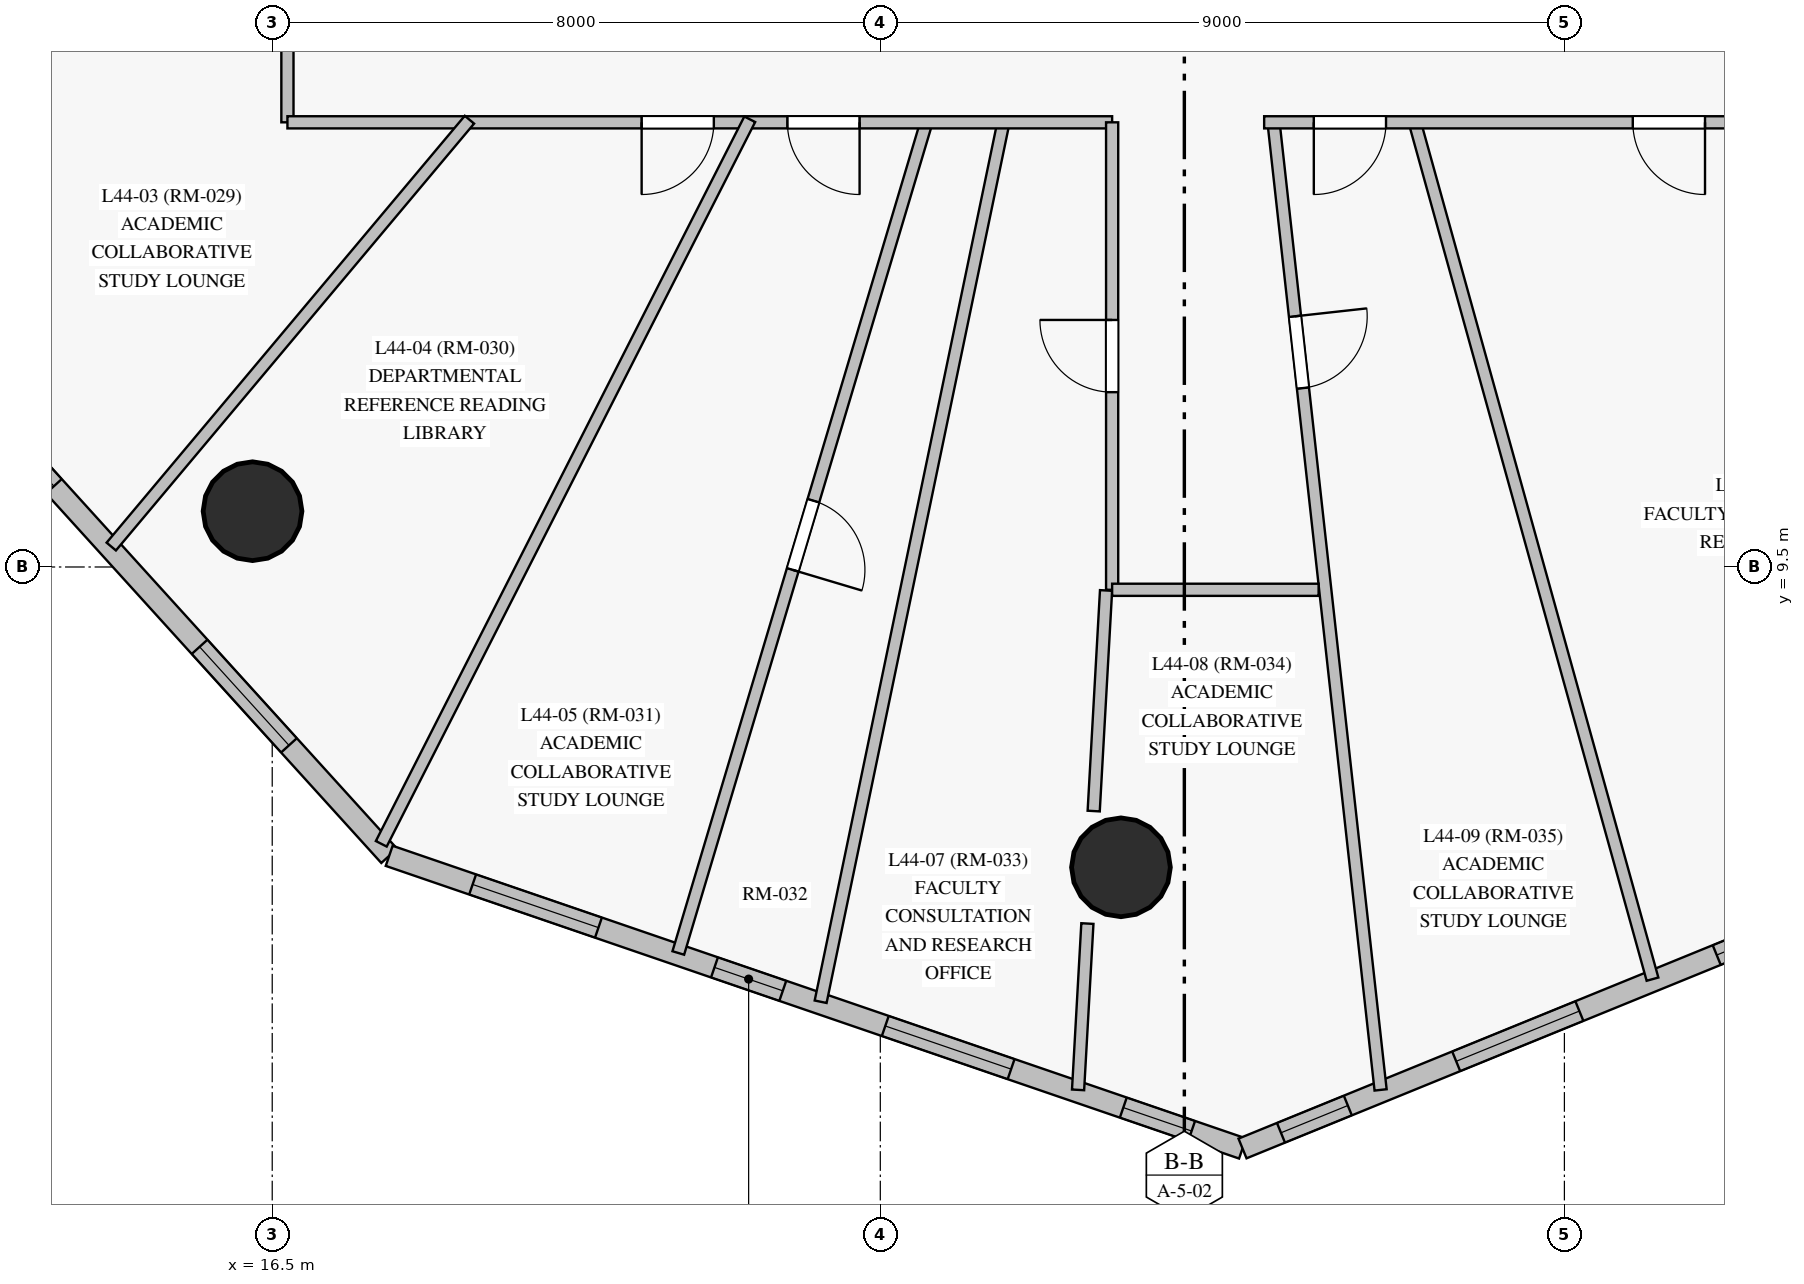
"""IFC4 building model, lengths in metres.
Left out: names, types, materials, properties, quantities, classifications, styles, units other than length and angle.
Written with IfcOpenShell. Run it as: python <this file> out.ifc"""

import sys

from ifc_helpers import new_model, si_unit, direction, frame, frame_2d, origin, origin_with_axes, origin_2d, place, context, subcontext, project, spatial, rectangle, circle, extrude, source, transform, mapped, element, fill, save


model = new_model("IFC4")
c1 = context("Model", 3, precision=1e-05, world=origin(), true_north=direction((0.0, 1.0)))
c2 = subcontext(c1, "Body", "Model", "MODEL_VIEW")
j1 = project(units=[si_unit("LENGTHUNIT", "METRE"), si_unit("PLANEANGLEUNIT", "RADIAN")], contexts=[c1])
p1 = place(None, origin())
s1 = spatial("IfcSite", under=j1, at=p1, CompositionType="ELEMENT")
p2 = place(p1, origin())
s2 = spatial("IfcBuilding", under=s1, at=p2, CompositionType="ELEMENT")
p3 = place(p2, frame((0.0, 0.0, 156.55)))
s3 = spatial("IfcBuildingStorey", under=s2, at=p3, CompositionType="ELEMENT", Elevation=156.55)
m1 = source(origin_with_axes(), c2, "Body", "SweptSolid", [
    extrude(circle(Radius=0.65, at=origin_2d()), origin(), (0.0, 0.0, 1.0), 3.05),
])
for number, where, z_axis, x_axis in (
    (1, (16.241, 10.234, 0.0), (0.0, 0.0, 1.0), (1.0, 0.0, 0.0)),
    (2, (27.666, 5.549, 0.0), (0.0, 0.0, 1.0), (1.0, 0.0, 0.0)),
):
    element("IfcColumn", number, at=place(p3, frame(where, z_axis=z_axis, x_axis=x_axis)), inside=s3, PredefinedType="COLUMN", context=c2, shape_type="MappedRepresentation", body=[
        mapped(m1, transform((0.0, 0.0, 0.0), scale=1.0)),
    ])
p4 = place(p3, frame((11.679, 12.711, 0.0), z_axis=(0.0, 0.0, 1.0), x_axis=(0.671864956499, -0.740673666488, 0.0)))
e3 = element("IfcWall", 3, at=p4, inside=s3, PredefinedType="SOLIDWALL", context=c2, shape_type="SweptSolid", body=[
    extrude(rectangle(XDim=9.466, YDim=0.28, at=frame_2d((4.733, 0.0))), origin(), (0.0, 0.0, 1.0), 2.825),
])
p5 = place(p4, frame((1.151, 0.0, 0.85)))
e4 = element("IfcOpeningElement", 4, at=p5, cuts=e3, PredefinedType="OPENING", context=c2, shape_type="SweptSolid", body=[
    extrude(rectangle(XDim=1.75, YDim=1.65, at=frame_2d((0.875, 0.825))), frame((0.0, 0.15, 0.0), z_axis=(0.0, -1.0, 0.0), x_axis=(1.0, 0.0, 0.0)), (0.0, 0.0, 1.0), 0.3),
])
p6 = place(p4, frame((5.754, 0.0, 0.85)))
e5 = element("IfcOpeningElement", 5, at=p6, cuts=e3, PredefinedType="OPENING", context=c2, shape_type="SweptSolid", body=[
    extrude(rectangle(XDim=1.75, YDim=1.65, at=frame_2d((0.875, 0.825))), frame((0.0, 0.15, 0.0), z_axis=(0.0, -1.0, 0.0), x_axis=(1.0, 0.0, 0.0)), (0.0, 0.0, 1.0), 0.3),
])
p7 = place(p3, frame((18.039, 5.7, 0.0), z_axis=(0.0, 0.0, 1.0), x_axis=(0.945926650716, -0.324380596624, 0.0)))
e6 = element("IfcWall", 6, at=p7, inside=s3, PredefinedType="SOLIDWALL", context=c2, shape_type="SweptSolid", body=[
    extrude(rectangle(XDim=11.868, YDim=0.28, at=frame_2d((5.934, 0.0))), origin(), (0.0, 0.0, 1.0), 2.825),
])
p8 = place(p7, frame((1.16, 0.0, 0.85)))
e7 = element("IfcOpeningElement", 7, at=p8, cuts=e6, PredefinedType="OPENING", context=c2, shape_type="SweptSolid", body=[
    extrude(rectangle(XDim=1.75, YDim=1.65, at=frame_2d((0.875, 0.825))), frame((0.0, 0.15, 0.0), z_axis=(0.0, -1.0, 0.0), x_axis=(1.0, 0.0, 0.0)), (0.0, 0.0, 1.0), 0.3),
])
p9 = place(p7, frame((4.524, 0.0, 0.85)))
e8 = element("IfcOpeningElement", 8, at=p9, cuts=e6, PredefinedType="OPENING", context=c2, shape_type="SweptSolid", body=[
    extrude(rectangle(XDim=0.95, YDim=1.5, at=frame_2d((0.475, 0.75))), frame((0.0, 0.15, 0.0), z_axis=(0.0, -1.0, 0.0), x_axis=(1.0, 0.0, 0.0)), (0.0, 0.0, 1.0), 0.3),
])
p10 = place(p7, frame((6.9, 0.0, 0.85)))
e9 = element("IfcOpeningElement", 9, at=p10, cuts=e6, PredefinedType="OPENING", context=c2, shape_type="SweptSolid", body=[
    extrude(rectangle(XDim=1.75, YDim=1.65, at=frame_2d((0.875, 0.825))), frame((0.0, 0.15, 0.0), z_axis=(0.0, -1.0, 0.0), x_axis=(1.0, 0.0, 0.0)), (0.0, 0.0, 1.0), 0.3),
])
p11 = place(p7, frame((10.21, 0.0, 0.85)))
e10 = element("IfcOpeningElement", 10, at=p11, cuts=e6, PredefinedType="OPENING", context=c2, shape_type="SweptSolid", body=[
    extrude(rectangle(XDim=0.95, YDim=1.5, at=frame_2d((0.475, 0.75))), frame((0.0, 0.15, 0.0), z_axis=(0.0, -1.0, 0.0), x_axis=(1.0, 0.0, 0.0)), (0.0, 0.0, 1.0), 0.3),
])
p12 = place(p3, frame((29.265, 1.85, 0.0), z_axis=(0.0, 0.0, 1.0), x_axis=(0.925942104455, 0.377665485842, 0.0)))
e11 = element("IfcWall", 11, at=p12, inside=s3, PredefinedType="SOLIDWALL", context=c2, shape_type="SweptSolid", body=[
    extrude(rectangle(XDim=9.446, YDim=0.28, at=frame_2d((4.723, 0.0))), origin(), (0.0, 0.0, 1.0), 2.825),
])
p13 = place(p12, frame((0.546, 0.0, 0.85)))
e12 = element("IfcOpeningElement", 12, at=p13, cuts=e11, PredefinedType="OPENING", context=c2, shape_type="SweptSolid", body=[
    extrude(rectangle(XDim=0.95, YDim=1.5, at=frame_2d((0.475, 0.75))), frame((0.0, 0.15, 0.0), z_axis=(0.0, -1.0, 0.0), x_axis=(1.0, 0.0, 0.0)), (0.0, 0.0, 1.0), 0.3),
])
p14 = place(p12, frame((3.036, 0.0, 0.85)))
e13 = element("IfcOpeningElement", 13, at=p14, cuts=e11, PredefinedType="OPENING", context=c2, shape_type="SweptSolid", body=[
    extrude(rectangle(XDim=1.75, YDim=1.65, at=frame_2d((0.875, 0.825))), frame((0.0, 0.15, 0.0), z_axis=(0.0, -1.0, 0.0), x_axis=(1.0, 0.0, 0.0)), (0.0, 0.0, 1.0), 0.3),
])
p15 = place(p12, frame((6.738, 0.0, 0.85)))
e14 = element("IfcOpeningElement", 14, at=p15, cuts=e11, PredefinedType="OPENING", context=c2, shape_type="SweptSolid", body=[
    extrude(rectangle(XDim=1.75, YDim=1.65, at=frame_2d((0.875, 0.825))), frame((0.0, 0.15, 0.0), z_axis=(0.0, -1.0, 0.0), x_axis=(1.0, 0.0, 0.0)), (0.0, 0.0, 1.0), 0.3),
])
p16 = place(p3, frame((16.7, 15.35, 0.0), z_axis=(0.0, 0.0, 1.0), x_axis=(0.0, 1.0, 0.0)))
e15 = element("IfcWall", 15, at=p16, inside=s3, PredefinedType="PARTITIONING", context=c2, shape_type="SweptSolid", body=[
    extrude(rectangle(XDim=22.3, YDim=0.16, at=frame_2d((11.15, 0.0))), origin(), (0.0, 0.0, 1.0), 2.275),
])
p17 = place(p16, frame((7.33, 0.0, 0.0)))
e16 = element("IfcOpeningElement", 16, at=p17, cuts=e15, PredefinedType="OPENING", context=c2, shape_type="SweptSolid", body=[
    extrude(rectangle(XDim=0.95, YDim=2.15, at=frame_2d((0.475, 1.075))), frame((0.0, 0.09, 0.0), z_axis=(0.0, -1.0, 0.0), x_axis=(1.0, 0.0, 0.0)), (0.0, 0.0, 1.0), 0.18),
])
p18 = place(p16, frame((5.1, 0.0, 0.0)))
e17 = element("IfcOpeningElement", 17, at=p18, cuts=e15, PredefinedType="OPENING", context=c2, shape_type="SweptSolid", body=[
    extrude(rectangle(XDim=0.96, YDim=2.15, at=frame_2d((0.48, 1.075))), frame((0.0, 0.09, 0.0), z_axis=(0.0, -1.0, 0.0), x_axis=(1.0, 0.0, 0.0)), (0.0, 0.0, 1.0), 0.18),
])
p19 = place(p16, frame((1.328, 0.0, 0.0)))
e18 = element("IfcOpeningElement", 18, at=p19, cuts=e15, PredefinedType="OPENING", context=c2, shape_type="SweptSolid", body=[
    extrude(rectangle(XDim=0.95, YDim=2.15, at=frame_2d((0.475, 1.075))), frame((0.0, 0.09, 0.0), z_axis=(0.0, -1.0, 0.0), x_axis=(1.0, 0.0, 0.0)), (0.0, 0.0, 1.0), 0.18),
])
p20 = place(p16, frame((14.02, 0.0, 0.0)))
e19 = element("IfcOpeningElement", 19, at=p20, cuts=e15, PredefinedType="OPENING", context=c2, shape_type="SweptSolid", body=[
    extrude(rectangle(XDim=0.95, YDim=2.15, at=frame_2d((0.475, 1.075))), frame((0.0, 0.09, 0.0), z_axis=(0.0, -1.0, 0.0), x_axis=(1.0, 0.0, 0.0)), (0.0, 0.0, 1.0), 0.18),
])
p21 = place(p3, frame((29.67, 15.38, 0.0), z_axis=(0.0, 0.0, 1.0), x_axis=(0.109963941435, -0.99393557718, 0.0)))
e20 = element("IfcWall", 20, at=p21, inside=s3, PredefinedType="PARTITIONING", context=c2, shape_type="SweptSolid", body=[
    extrude(rectangle(XDim=12.837, YDim=0.16, at=frame_2d((6.418, 0.0))), origin(), (0.0, 0.0, 1.0), 2.825),
])
p22 = place(p21, frame((2.598, 0.0, 0.0)))
e21 = element("IfcOpeningElement", 21, at=p22, cuts=e20, PredefinedType="OPENING", context=c2, shape_type="SweptSolid", body=[
    extrude(rectangle(XDim=0.95, YDim=2.15, at=frame_2d((0.475, 1.075))), frame((0.0, 0.09, 0.0), z_axis=(0.0, -1.0, 0.0), x_axis=(1.0, 0.0, 0.0)), (0.0, 0.0, 1.0), 0.18),
])
p23 = place(p3, frame((26.127, 15.379, 0.0), z_axis=(0.0, 0.0, 1.0), x_axis=(-0.203560877861, -0.979062290666, 0.0)))
e22 = element("IfcWall", 22, at=p23, inside=s3, PredefinedType="PARTITIONING", context=c2, shape_type="SweptSolid", body=[
    extrude(rectangle(XDim=11.847, YDim=0.16, at=frame_2d((5.924, 0.0))), origin(), (0.0, 0.0, 1.0), 2.825),
])
p24 = place(p3, frame((31.523, 15.379, 0.0), z_axis=(0.0, 0.0, 1.0), x_axis=(0.267361493454, -0.963596301268, 0.0)))
e23 = element("IfcWall", 23, at=p24, inside=s3, PredefinedType="PARTITIONING", context=c2, shape_type="SweptSolid", body=[
    extrude(rectangle(XDim=11.729, YDim=0.16, at=frame_2d((5.864, 0.0))), origin(), (0.0, 0.0, 1.0), 2.825),
])
p25 = place(p3, frame((25.115, 15.379, 0.0), z_axis=(0.0, 0.0, 1.0), x_axis=(-0.286223364171, -0.958162922369, 0.0)))
e24 = element("IfcWall", 24, at=p25, inside=s3, PredefinedType="PARTITIONING", context=c2, shape_type="SweptSolid", body=[
    extrude(rectangle(XDim=11.435, YDim=0.16, at=frame_2d((5.718, 0.0))), origin(), (0.0, 0.0, 1.0), 2.825),
])
p26 = place(p25, frame((5.225, 0.0, 0.0)))
e25 = element("IfcOpeningElement", 25, at=p26, cuts=e24, PredefinedType="OPENING", context=c2, shape_type="SweptSolid", body=[
    extrude(rectangle(XDim=0.95, YDim=2.15, at=frame_2d((0.475, 1.075))), frame((0.0, 0.09, 0.0), z_axis=(0.0, -1.0, 0.0), x_axis=(1.0, 0.0, 0.0)), (0.0, 0.0, 1.0), 0.18),
])
p27 = place(p3, frame((27.55, 15.35, 0.0), z_axis=(0.0, 0.0, 1.0), x_axis=(-1.0, 0.0, 0.0)))
e26 = element("IfcWall", 26, at=p27, inside=s3, PredefinedType="PARTITIONING", context=c2, shape_type="SweptSolid", body=[
    extrude(rectangle(XDim=10.85, YDim=0.16, at=frame_2d((5.425, 0.0))), origin(), (0.0, 0.0, 1.0), 2.375),
])
p28 = place(p27, frame((5.24, 0.0, 0.0)))
e27 = element("IfcOpeningElement", 27, at=p28, cuts=e26, PredefinedType="OPENING", context=c2, shape_type="SweptSolid", body=[
    extrude(rectangle(XDim=0.95, YDim=2.15, at=frame_2d((0.475, 1.075))), frame((0.0, 0.09, 0.0), z_axis=(0.0, -1.0, 0.0), x_axis=(1.0, 0.0, 0.0)), (0.0, 0.0, 1.0), 0.18),
])
p29 = place(p27, frame((3.323, 0.0, 0.0)))
e28 = element("IfcOpeningElement", 28, at=p29, cuts=e26, PredefinedType="OPENING", context=c2, shape_type="SweptSolid", body=[
    extrude(rectangle(XDim=0.95, YDim=2.15, at=frame_2d((0.475, 1.075))), frame((0.0, 0.09, 0.0), z_axis=(0.0, -1.0, 0.0), x_axis=(1.0, 0.0, 0.0)), (0.0, 0.0, 1.0), 0.18),
])
p30 = place(p3, frame((40.2, 15.35, 0.0), z_axis=(0.0, 0.0, 1.0), x_axis=(-1.0, 0.0, 0.0)))
e29 = element("IfcWall", 29, at=p30, inside=s3, PredefinedType="PARTITIONING", context=c2, shape_type="SweptSolid", body=[
    extrude(rectangle(XDim=10.65, YDim=0.16, at=frame_2d((5.325, 0.0))), origin(), (0.0, 0.0, 1.0), 2.275),
])
p31 = place(p30, frame((9.047, 0.0, 0.0)))
e30 = element("IfcOpeningElement", 30, at=p31, cuts=e29, PredefinedType="OPENING", context=c2, shape_type="SweptSolid", body=[
    extrude(rectangle(XDim=0.95, YDim=2.15, at=frame_2d((0.475, 1.075))), frame((0.0, 0.09, 0.0), z_axis=(0.0, -1.0, 0.0), x_axis=(1.0, 0.0, 0.0)), (0.0, 0.0, 1.0), 0.18),
])
p32 = place(p30, frame((4.85, 0.0, 0.0)))
e31 = element("IfcOpeningElement", 31, at=p32, cuts=e29, PredefinedType="OPENING", context=c2, shape_type="SweptSolid", body=[
    extrude(rectangle(XDim=0.95, YDim=2.15, at=frame_2d((0.475, 1.075))), frame((0.0, 0.09, 0.0), z_axis=(0.0, -1.0, 0.0), x_axis=(1.0, 0.0, 0.0)), (0.0, 0.0, 1.0), 0.18),
])
p33 = place(p3, frame((22.782, 15.39, 0.0), z_axis=(0.0, 0.0, 1.0), x_axis=(-0.453312470981, -0.891351672267, 0.0)))
e32 = element("IfcWall", 32, at=p33, inside=s3, PredefinedType="PARTITIONING", context=c2, shape_type="SweptSolid", body=[
    extrude(rectangle(XDim=10.694, YDim=0.16, at=frame_2d((5.347, 0.0))), origin(), (0.0, 0.0, 1.0), 2.825),
])
p34 = place(p3, frame((19.094, 15.385, 0.0), z_axis=(0.0, 0.0, 1.0), x_axis=(-0.642788201526, -0.766043946506, 0.0)))
e33 = element("IfcWall", 33, at=p34, inside=s3, PredefinedType="PARTITIONING", context=c2, shape_type="SweptSolid", body=[
    extrude(rectangle(XDim=7.331, YDim=0.16, at=frame_2d((3.666, 0.0))), origin(), (0.0, 0.0, 1.0), 2.275),
])
p35 = place(p3, frame((16.726, 19.243, 0.0), z_axis=(0.0, 0.0, 1.0), x_axis=(-0.849037712217, -0.528332247012, 0.0)))
e34 = element("IfcWall", 34, at=p35, inside=s3, PredefinedType="PARTITIONING", context=c2, shape_type="SweptSolid", body=[
    extrude(rectangle(XDim=6.956, YDim=0.16, at=frame_2d((3.478, 0.0))), origin(), (0.0, 0.0, 1.0), 2.825),
])
p36 = place(p3, frame((27.55, 9.2, 0.0), z_axis=(0.0, 0.0, 1.0), x_axis=(0.0, 1.0, 0.0)))
e35 = element("IfcWall", 35, at=p36, inside=s3, PredefinedType="PARTITIONING", context=c2, shape_type="SweptSolid", body=[
    extrude(rectangle(XDim=6.15, YDim=0.16, at=frame_2d((3.075, 0.0))), origin(), (0.0, 0.0, 1.0), 2.275),
])
p37 = place(p36, frame((2.6, 0.0, 0.0)))
e36 = element("IfcOpeningElement", 36, at=p37, cuts=e35, PredefinedType="OPENING", context=c2, shape_type="SweptSolid", body=[
    extrude(rectangle(XDim=0.95, YDim=2.15, at=frame_2d((0.475, 1.075))), frame((0.0, 0.09, 0.0), z_axis=(0.0, -1.0, 0.0), x_axis=(1.0, 0.0, 0.0)), (0.0, 0.0, 1.0), 0.18),
])
p38 = place(p3, frame((27.47, 9.191, 0.0), z_axis=(0.0, 0.0, 1.0), x_axis=(-0.0559398618, -0.998434139972, 0.0)))
e37 = element("IfcWall", 37, at=p38, inside=s3, PredefinedType="PARTITIONING", context=c2, shape_type="SweptSolid", body=[
    extrude(rectangle(XDim=2.907, YDim=0.16, at=frame_2d((1.453, 0.0))), origin(), (0.0, 0.0, 1.0), 2.275),
])
p39 = place(p3, frame((27.224, 4.809, 0.0), z_axis=(0.0, 0.0, 1.0), x_axis=(-0.055926613573, -0.99843488215, 0.0)))
e38 = element("IfcWall", 38, at=p39, inside=s3, PredefinedType="PARTITIONING", context=c2, shape_type="SweptSolid", body=[
    extrude(rectangle(XDim=2.191, YDim=0.16, at=frame_2d((1.096, 0.0))), origin(), (0.0, 0.0, 1.0), 2.825),
])
p40 = place(p3, frame((30.266, 9.2, 0.0), z_axis=(0.0, 0.0, 1.0), x_axis=(-1.0, 0.0, 0.0)))
e39 = element("IfcWall", 39, at=p40, inside=s3, PredefinedType="PARTITIONING", context=c2, shape_type="SweptSolid", body=[
    extrude(rectangle(XDim=2.716, YDim=0.16, at=frame_2d((1.358, 0.0))), origin(), (0.0, 0.0, 1.0), 2.495),
])
m2 = source(origin_with_axes(), c2, "Body", "SweptSolid", [
    extrude(rectangle(XDim=1.75, YDim=1.65, at=frame_2d((0.875, 0.825))), frame((0.0, 0.03, 0.0), z_axis=(0.0, -1.0, 0.0), x_axis=(1.0, 0.0, 0.0)), (0.0, 0.0, 1.0), 0.06),
])
p41 = place(p5, origin())
e40 = element("IfcWindow", 40, at=p41, inside=s3, PartitioningType="SINGLE_PANEL", PredefinedType="WINDOW", context=c2, shape_type="MappedRepresentation", body=[
    mapped(m2, transform((0.0, 0.0, 0.0), scale=1.0)),
])
fill(e4, e40)
p42 = place(p6, origin())
e41 = element("IfcWindow", 41, at=p42, inside=s3, PartitioningType="SINGLE_PANEL", PredefinedType="WINDOW", context=c2, shape_type="MappedRepresentation", body=[
    mapped(m2, transform((0.0, 0.0, 0.0), scale=1.0)),
])
fill(e5, e41)
p43 = place(p8, origin())
e42 = element("IfcWindow", 42, at=p43, inside=s3, PartitioningType="SINGLE_PANEL", PredefinedType="WINDOW", context=c2, shape_type="MappedRepresentation", body=[
    mapped(m2, transform((0.0, 0.0, 0.0), scale=1.0)),
])
fill(e7, e42)
m3 = source(origin_with_axes(), c2, "Body", "SweptSolid", [
    extrude(rectangle(XDim=0.95, YDim=1.5, at=frame_2d((0.475, 0.75))), frame((0.0, 0.03, 0.0), z_axis=(0.0, -1.0, 0.0), x_axis=(1.0, 0.0, 0.0)), (0.0, 0.0, 1.0), 0.06),
])
p44 = place(p9, origin())
e43 = element("IfcWindow", 43, at=p44, inside=s3, PartitioningType="SINGLE_PANEL", PredefinedType="WINDOW", context=c2, shape_type="MappedRepresentation", body=[
    mapped(m3, transform((0.0, 0.0, 0.0), scale=1.0)),
])
fill(e8, e43)
p45 = place(p10, origin())
e44 = element("IfcWindow", 44, at=p45, inside=s3, PartitioningType="SINGLE_PANEL", PredefinedType="WINDOW", context=c2, shape_type="MappedRepresentation", body=[
    mapped(m2, transform((0.0, 0.0, 0.0), scale=1.0)),
])
fill(e9, e44)
p46 = place(p11, origin())
e45 = element("IfcWindow", 45, at=p46, inside=s3, PartitioningType="SINGLE_PANEL", PredefinedType="WINDOW", context=c2, shape_type="MappedRepresentation", body=[
    mapped(m3, transform((0.0, 0.0, 0.0), scale=1.0)),
])
fill(e10, e45)
p47 = place(p13, origin())
e46 = element("IfcWindow", 46, at=p47, inside=s3, PartitioningType="SINGLE_PANEL", PredefinedType="WINDOW", context=c2, shape_type="MappedRepresentation", body=[
    mapped(m3, transform((0.0, 0.0, 0.0), scale=1.0)),
])
fill(e12, e46)
p48 = place(p14, origin())
e47 = element("IfcWindow", 47, at=p48, inside=s3, PartitioningType="SINGLE_PANEL", PredefinedType="WINDOW", context=c2, shape_type="MappedRepresentation", body=[
    mapped(m2, transform((0.0, 0.0, 0.0), scale=1.0)),
])
fill(e13, e47)
p49 = place(p15, origin())
e48 = element("IfcWindow", 48, at=p49, inside=s3, PartitioningType="SINGLE_PANEL", PredefinedType="WINDOW", context=c2, shape_type="MappedRepresentation", body=[
    mapped(m2, transform((0.0, 0.0, 0.0), scale=1.0)),
])
fill(e14, e48)
m4 = source(origin_with_axes(), c2, "Body", "SweptSolid", [
    extrude(rectangle(XDim=0.95, YDim=2.15, at=frame_2d((0.475, 1.075))), frame((0.0, 0.025, 0.0), z_axis=(0.0, -1.0, 0.0), x_axis=(1.0, 0.0, 0.0)), (0.0, 0.0, 1.0), 0.05),
])
p50 = place(p28, origin())
e49 = element("IfcDoor", 49, at=p50, inside=s3, OperationType="SINGLE_SWING_RIGHT", PredefinedType="DOOR", context=c2, shape_type="MappedRepresentation", body=[
    mapped(m4, transform((0.0, 0.0, 0.0), scale=1.0)),
])
fill(e27, e49)
p51 = place(p29, origin())
e50 = element("IfcDoor", 50, at=p51, inside=s3, OperationType="SINGLE_SWING_LEFT", PredefinedType="DOOR", context=c2, shape_type="MappedRepresentation", body=[
    mapped(m4, transform((0.0, 0.0, 0.0), scale=1.0)),
])
fill(e28, e50)
p52 = place(p37, origin())
e51 = element("IfcDoor", 51, at=p52, inside=s3, OperationType="SINGLE_SWING_RIGHT", PredefinedType="DOOR", context=c2, shape_type="MappedRepresentation", body=[
    mapped(m4, transform((0.0, 0.0, 0.0), scale=1.0)),
])
fill(e36, e51)
p53 = place(p22, origin())
e52 = element("IfcDoor", 52, at=p53, inside=s3, OperationType="SINGLE_SWING_LEFT", PredefinedType="DOOR", context=c2, shape_type="MappedRepresentation", body=[
    mapped(m4, transform((0.0, 0.0, 0.0), scale=1.0)),
])
fill(e21, e52)
p54 = place(p31, origin())
e53 = element("IfcDoor", 53, at=p54, inside=s3, OperationType="SINGLE_SWING_RIGHT", PredefinedType="DOOR", context=c2, shape_type="MappedRepresentation", body=[
    mapped(m4, transform((0.0, 0.0, 0.0), scale=1.0)),
])
fill(e30, e53)
p55 = place(p32, origin())
e54 = element("IfcDoor", 54, at=p55, inside=s3, OperationType="SINGLE_SWING_LEFT", PredefinedType="DOOR", context=c2, shape_type="MappedRepresentation", body=[
    mapped(m4, transform((0.0, 0.0, 0.0), scale=1.0)),
])
fill(e31, e54)
p56 = place(p26, origin())
e55 = element("IfcDoor", 55, at=p56, inside=s3, OperationType="SINGLE_SWING_RIGHT", PredefinedType="DOOR", context=c2, shape_type="MappedRepresentation", body=[
    mapped(m4, transform((0.0, 0.0, 0.0), scale=1.0)),
])
fill(e25, e55)
save(model, sys.argv[1])
